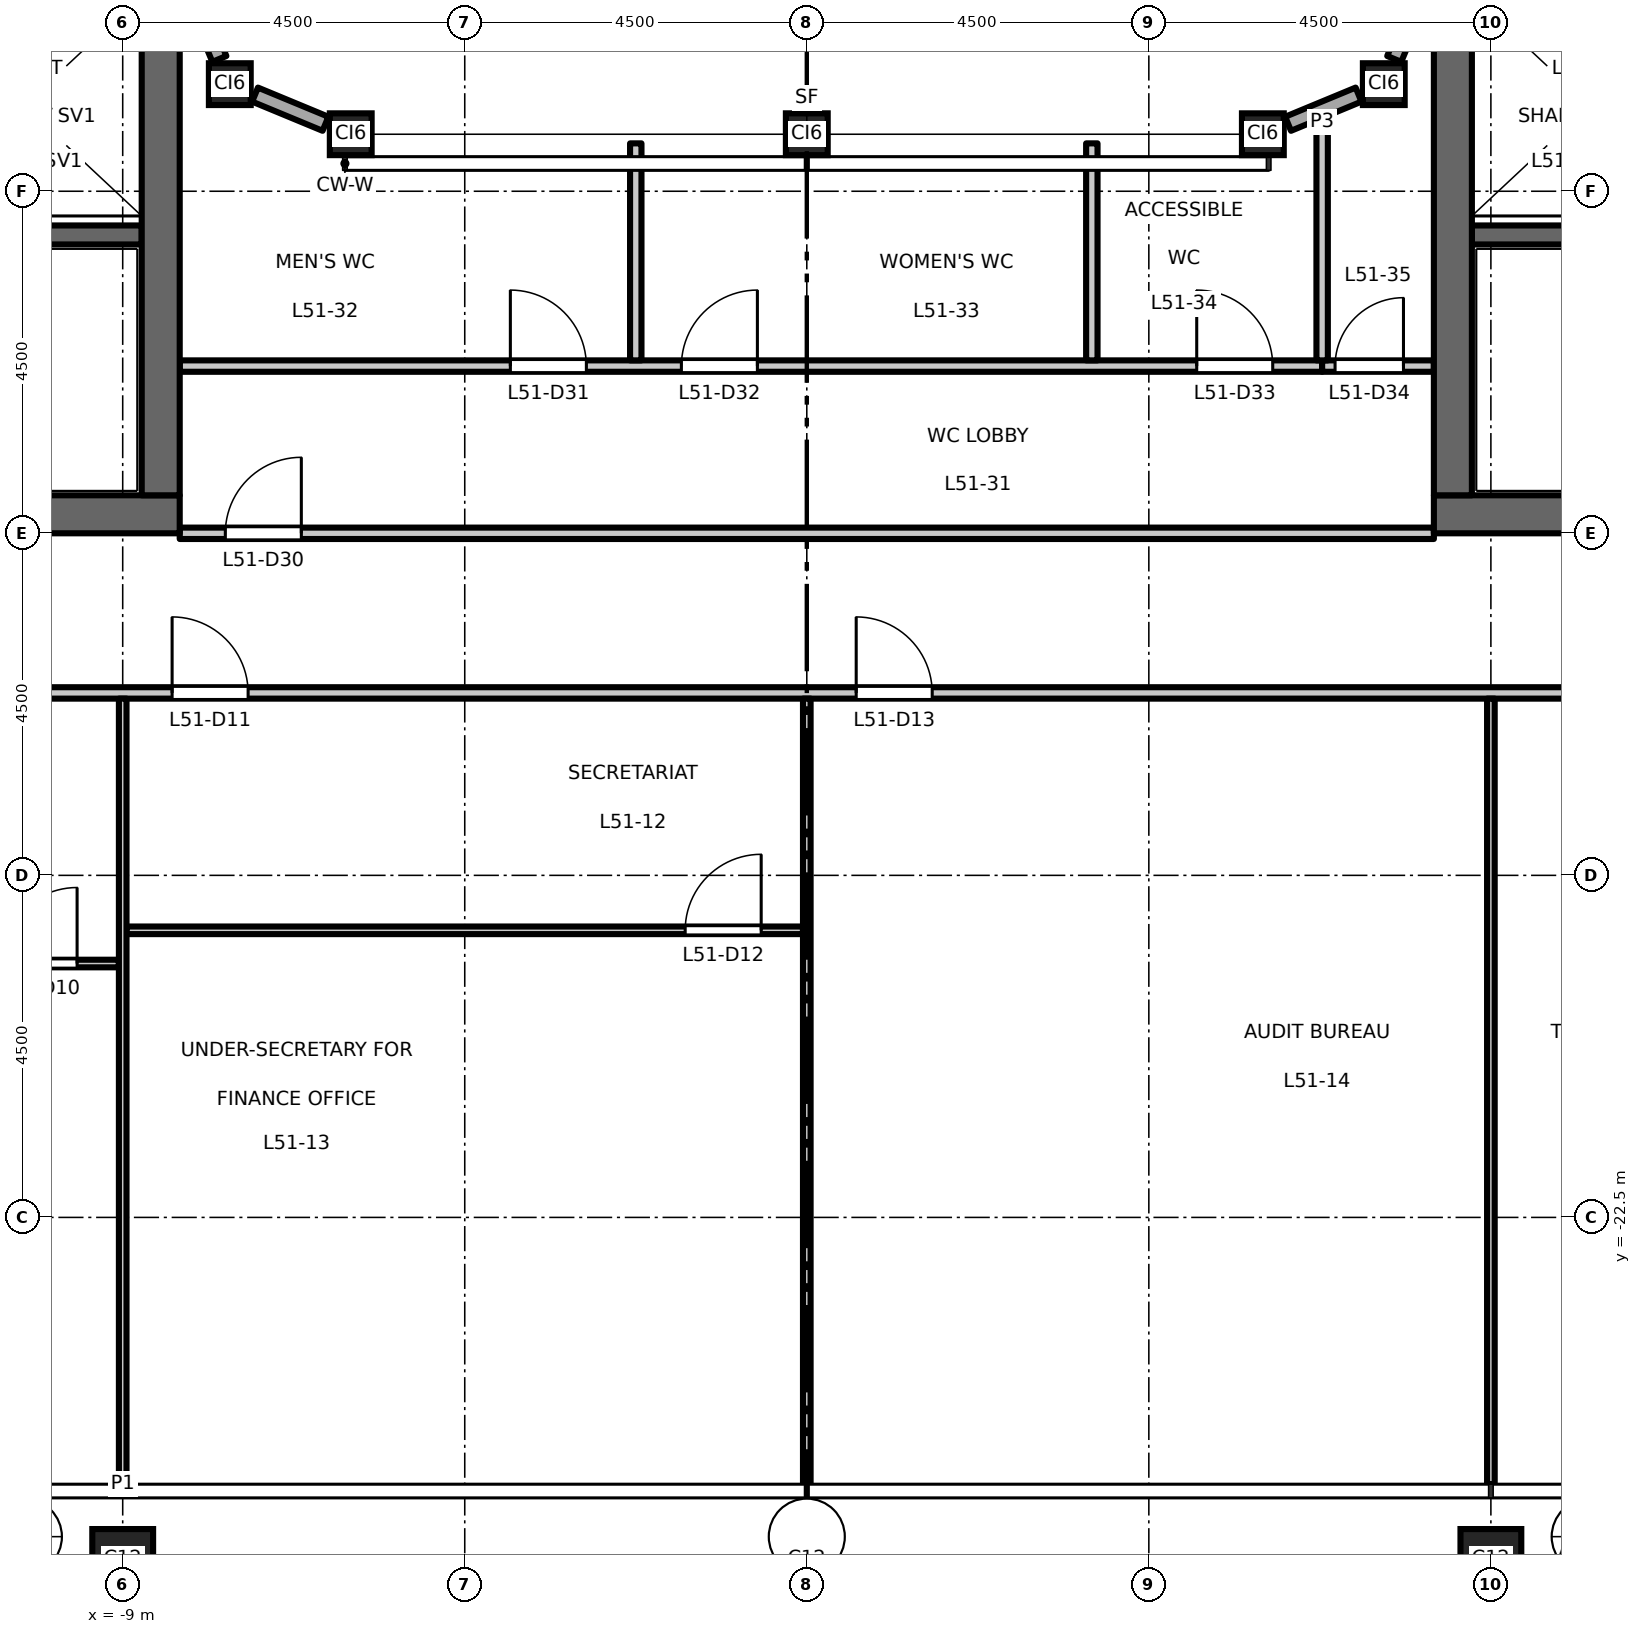
"""IFC4 building model, lengths in metres.
Left out: names, types, materials, properties, quantities, classifications, styles, units other than length and angle.
Written with IfcOpenShell. Run it as: python <this file> out.ifc"""

import sys

from ifc_helpers import new_model, si_unit, direction, frame, frame_2d, origin, origin_2d, place, context, subcontext, project, spatial, rectangle, hollow_rectangle, extrude, element, fill, save


model = new_model("IFC4")
c1 = context("Model", 3, precision=1e-05, world=origin(), true_north=direction((0.0, 1.0)))
c2 = subcontext(c1, "Body", "Model", "MODEL_VIEW")
j1 = project(units=[si_unit("LENGTHUNIT", "METRE"), si_unit("PLANEANGLEUNIT", "RADIAN")], contexts=[c1])
p1 = place(None, origin())
s1 = spatial("IfcSite", under=j1, at=p1, CompositionType="ELEMENT")
p2 = place(p1, origin())
s2 = spatial("IfcBuilding", under=s1, at=p2, CompositionType="ELEMENT")
p3 = place(p2, frame((0.0, 0.0, 237.7)))
s3 = spatial("IfcBuildingStorey", under=s2, at=p3, CompositionType="ELEMENT", Elevation=237.7)
for number, where, z_axis, x_axis in (
    (1, (-9.0, -27.0, 0.0), (0.0, 0.0, 1.0), (1.0, 0.0, 0.0)),
    (2, (0.0, -27.0, 0.0), (0.0, 0.0, 1.0), (1.0, 0.0, 0.0)),
    (3, (9.0, -27.0, 0.0), (0.0, 0.0, 1.0), (1.0, 0.0, 0.0)),
):
    element("IfcColumn", number, at=place(p3, frame(where, z_axis=z_axis, x_axis=x_axis)), inside=s3, PredefinedType="COLUMN", context=c2, shape_type="SweptSolid", body=[
        extrude(hollow_rectangle(XDim=0.8, YDim=0.8, WallThickness=0.045, at=origin_2d()), origin(), (0.0, 0.0, 1.0), 4.5),
    ])
for number, where, z_axis, x_axis in (
    (4, (-7.591, -7.591, 0.0), (0.0, 0.0, 1.0), (1.0, 0.0, 0.0)),
    (5, (-6.0, -8.25, 0.0), (0.0, 0.0, 1.0), (1.0, 0.0, 0.0)),
    (6, (0.0, -8.25, 0.0), (0.0, 0.0, 1.0), (1.0, 0.0, 0.0)),
    (7, (6.0, -8.25, 0.0), (0.0, 0.0, 1.0), (1.0, 0.0, 0.0)),
    (8, (7.591, -7.591, 0.0), (0.0, 0.0, 1.0), (1.0, 0.0, 0.0)),
):
    element("IfcColumn", number, at=place(p3, frame(where, z_axis=z_axis, x_axis=x_axis)), inside=s3, PredefinedType="COLUMN", context=c2, shape_type="SweptSolid", body=[
        extrude(hollow_rectangle(XDim=0.55, YDim=0.55, WallThickness=0.028, at=origin_2d()), origin(), (0.0, 0.0, 1.0), 4.5),
    ])
p4 = place(p3, frame((-8.75, -9.575, 0.0), z_axis=(0.0, 0.0, 1.0), x_axis=(-1.0, 0.0, 0.0)))
e9 = element("IfcWall", 9, at=p4, inside=s3, PredefinedType="SHEAR", context=c2, shape_type="SweptSolid", body=[
    extrude(rectangle(XDim=8.0, YDim=0.25, at=frame_2d((4.0, 0.0))), origin(), (0.0, 0.0, 1.0), 4.35),
])
p5 = place(p4, frame((6.65, 0.0, 0.0)))
e10 = element("IfcOpeningElement", 10, at=p5, cuts=e9, PredefinedType="OPENING", context=c2, shape_type="SweptSolid", body=[
    extrude(rectangle(XDim=1.1, YDim=2.1, at=frame_2d((0.55, 1.05))), frame((0.0, 0.135, 0.0), z_axis=(0.0, -1.0, 0.0), x_axis=(1.0, 0.0, 0.0)), (0.0, 0.0, 1.0), 0.27),
])
p6 = place(p3, frame((-8.25, -13.25, 0.0), z_axis=(0.0, 0.0, 1.0), x_axis=(-1.0, 0.0, 0.0)))
e11 = element("IfcWall", 11, at=p6, inside=s3, PredefinedType="SHEAR", context=c2, shape_type="SweptSolid", body=[
    extrude(rectangle(XDim=13.5, YDim=0.5, at=frame_2d((6.75, 0.0))), origin(), (0.0, 0.0, 1.0), 4.35),
])
p7 = place(p3, frame((-8.5, -13.0, 0.0), z_axis=(0.0, 0.0, 1.0), x_axis=(0.0, 1.0, 0.0)))
e12 = element("IfcWall", 12, at=p7, inside=s3, PredefinedType="SHEAR", context=c2, shape_type="SweptSolid", body=[
    extrude(rectangle(XDim=26.0, YDim=0.5, at=frame_2d((13.0, 0.0))), origin(), (0.0, 0.0, 1.0), 4.35),
])
p8 = place(p3, frame((8.75, -9.575, 0.0), z_axis=(0.0, 0.0, 1.0), x_axis=(1.0, 0.0, 0.0)))
e13 = element("IfcWall", 13, at=p8, inside=s3, PredefinedType="SHEAR", context=c2, shape_type="SweptSolid", body=[
    extrude(rectangle(XDim=8.0, YDim=0.25, at=frame_2d((4.0, 0.0))), origin(), (0.0, 0.0, 1.0), 4.35),
])
p9 = place(p8, frame((6.65, 0.0, 0.0)))
e14 = element("IfcOpeningElement", 14, at=p9, cuts=e13, PredefinedType="OPENING", context=c2, shape_type="SweptSolid", body=[
    extrude(rectangle(XDim=1.1, YDim=2.1, at=frame_2d((0.55, 1.05))), frame((0.0, 0.135, 0.0), z_axis=(0.0, -1.0, 0.0), x_axis=(1.0, 0.0, 0.0)), (0.0, 0.0, 1.0), 0.27),
])
p10 = place(p3, frame((8.25, -13.25, 0.0), z_axis=(0.0, 0.0, 1.0), x_axis=(1.0, 0.0, 0.0)))
e15 = element("IfcWall", 15, at=p10, inside=s3, PredefinedType="SHEAR", context=c2, shape_type="SweptSolid", body=[
    extrude(rectangle(XDim=13.5, YDim=0.5, at=frame_2d((6.75, 0.0))), origin(), (0.0, 0.0, 1.0), 4.35),
])
p11 = place(p3, frame((8.5, -13.0, 0.0), z_axis=(0.0, 0.0, 1.0), x_axis=(0.0, 1.0, 0.0)))
e16 = element("IfcWall", 16, at=p11, inside=s3, PredefinedType="SHEAR", context=c2, shape_type="SweptSolid", body=[
    extrude(rectangle(XDim=26.0, YDim=0.5, at=frame_2d((13.0, 0.0))), origin(), (0.0, 0.0, 1.0), 4.35),
])
p12 = place(p3, frame((6.332, -8.113, 0.0), z_axis=(0.0, 0.0, 1.0), x_axis=(0.923859650767, 0.382731427616, 0.0)))
e17 = element("IfcWall", 17, at=p12, inside=s3, PredefinedType="STANDARD", context=c2, shape_type="SweptSolid", body=[
    extrude(rectangle(XDim=1.003, YDim=0.2, at=frame_2d((0.502, 0.0))), origin(), (0.0, 0.0, 1.0), 3.918),
])
for number, where, z_axis, x_axis in (
    (18, (7.729, -7.259, 0.0), (0.0, 0.0, 1.0), (0.383, 0.924, 0.0)),
    (19, (-8.154, -6.231, 0.0), (0.0, 0.0, 1.0), (0.383, -0.924, 0.0)),
):
    element("IfcWall", number, at=place(p3, frame(where, z_axis=z_axis, x_axis=x_axis)), inside=s3, PredefinedType="STANDARD", context=c2, shape_type="SweptSolid", body=[
        extrude(rectangle(XDim=1.113, YDim=0.2, at=frame_2d((0.556, 0.0))), origin(), (0.0, 0.0, 1.0), 3.918),
    ])
p13 = place(p3, frame((-7.259, -7.729, 0.0), z_axis=(0.0, 0.0, 1.0), x_axis=(0.923859650767, -0.382731427616, 0.0)))
e20 = element("IfcWall", 20, at=p13, inside=s3, PredefinedType="STANDARD", context=c2, shape_type="SweptSolid", body=[
    extrude(rectangle(XDim=1.003, YDim=0.2, at=frame_2d((0.502, 0.0))), origin(), (0.0, 0.0, 1.0), 3.918),
])
p14 = place(p3, frame((-17.95, -19.16, 0.0), z_axis=(0.0, 0.0, 1.0), x_axis=(1.0, 0.0, 0.0)))
e21 = element("IfcWall", 21, at=p14, inside=s3, PredefinedType="PARTITIONING", context=c2, shape_type="SweptSolid", body=[
    extrude(rectangle(XDim=8.9, YDim=0.1, at=frame_2d((4.45, 0.0))), origin(), (0.0, 0.0, 1.0), 4.35),
])
p15 = place(p14, frame((7.35, 0.0, 0.0)))
e22 = element("IfcOpeningElement", 22, at=p15, cuts=e21, PredefinedType="OPENING", context=c2, shape_type="SweptSolid", body=[
    extrude(rectangle(XDim=1.0, YDim=2.1, at=frame_2d((0.5, 1.05))), frame((0.0, 0.06, 0.0), z_axis=(0.0, -1.0, 0.0), x_axis=(1.0, 0.0, 0.0)), (0.0, 0.0, 1.0), 0.12),
])
p16 = place(p3, frame((-8.95, -18.723, 0.0), z_axis=(0.0, 0.0, 1.0), x_axis=(1.0, 0.0, 0.0)))
e23 = element("IfcWall", 23, at=p16, inside=s3, PredefinedType="PARTITIONING", context=c2, shape_type="SweptSolid", body=[
    extrude(rectangle(XDim=8.9, YDim=0.1, at=frame_2d((4.45, 0.0))), origin(), (0.0, 0.0, 1.0), 4.35),
])
p17 = place(p16, frame((7.35, 0.0, 0.0)))
e24 = element("IfcOpeningElement", 24, at=p17, cuts=e23, PredefinedType="OPENING", context=c2, shape_type="SweptSolid", body=[
    extrude(rectangle(XDim=1.0, YDim=2.1, at=frame_2d((0.5, 1.05))), frame((0.0, 0.06, 0.0), z_axis=(0.0, -1.0, 0.0), x_axis=(1.0, 0.0, 0.0)), (0.0, 0.0, 1.0), 0.12),
])
p18 = place(p3, frame((-23.925, -15.6, 0.0), z_axis=(0.0, 0.0, 1.0), x_axis=(1.0, 0.0, 0.0)))
e25 = element("IfcWall", 25, at=p18, inside=s3, PredefinedType="PARTITIONING", context=c2, shape_type="SweptSolid", body=[
    extrude(rectangle(XDim=47.85, YDim=0.15, at=frame_2d((23.925, 0.0))), origin(), (0.0, 0.0, 1.0), 4.35),
])
p19 = place(p18, frame((6.575, 0.0, 0.0)))
e26 = element("IfcOpeningElement", 26, at=p19, cuts=e25, PredefinedType="OPENING", context=c2, shape_type="SweptSolid", body=[
    extrude(rectangle(XDim=1.0, YDim=2.1, at=frame_2d((0.5, 1.05))), frame((0.0, 0.085, 0.0), z_axis=(0.0, -1.0, 0.0), x_axis=(1.0, 0.0, 0.0)), (0.0, 0.0, 1.0), 0.17),
])
p20 = place(p18, frame((15.575, 0.0, 0.0)))
e27 = element("IfcOpeningElement", 27, at=p20, cuts=e25, PredefinedType="OPENING", context=c2, shape_type="SweptSolid", body=[
    extrude(rectangle(XDim=1.0, YDim=2.1, at=frame_2d((0.5, 1.05))), frame((0.0, 0.085, 0.0), z_axis=(0.0, -1.0, 0.0), x_axis=(1.0, 0.0, 0.0)), (0.0, 0.0, 1.0), 0.17),
])
p21 = place(p18, frame((24.575, 0.0, 0.0)))
e28 = element("IfcOpeningElement", 28, at=p21, cuts=e25, PredefinedType="OPENING", context=c2, shape_type="SweptSolid", body=[
    extrude(rectangle(XDim=1.0, YDim=2.1, at=frame_2d((0.5, 1.05))), frame((0.0, 0.085, 0.0), z_axis=(0.0, -1.0, 0.0), x_axis=(1.0, 0.0, 0.0)), (0.0, 0.0, 1.0), 0.17),
])
p22 = place(p18, frame((40.325, 0.0, 0.0)))
e29 = element("IfcOpeningElement", 29, at=p22, cuts=e25, PredefinedType="OPENING", context=c2, shape_type="SweptSolid", body=[
    extrude(rectangle(XDim=1.0, YDim=2.1, at=frame_2d((0.5, 1.05))), frame((0.0, 0.085, 0.0), z_axis=(0.0, -1.0, 0.0), x_axis=(1.0, 0.0, 0.0)), (0.0, 0.0, 1.0), 0.17),
])
p23 = place(p18, frame((0.725, 0.0, 0.0)))
e30 = element("IfcOpeningElement", 30, at=p23, cuts=e25, PredefinedType="OPENING", context=c2, shape_type="SweptSolid", body=[
    extrude(rectangle(XDim=1.0, YDim=2.1, at=frame_2d((0.5, 1.05))), frame((0.0, 0.085, 0.0), z_axis=(0.0, -1.0, 0.0), x_axis=(1.0, 0.0, 0.0)), (0.0, 0.0, 1.0), 0.17),
])
p24 = place(p18, frame((42.575, 0.0, 0.0)))
e31 = element("IfcOpeningElement", 31, at=p24, cuts=e25, PredefinedType="OPENING", context=c2, shape_type="SweptSolid", body=[
    extrude(rectangle(XDim=1.0, YDim=2.1, at=frame_2d((0.5, 1.05))), frame((0.0, 0.085, 0.0), z_axis=(0.0, -1.0, 0.0), x_axis=(1.0, 0.0, 0.0)), (0.0, 0.0, 1.0), 0.17),
])
p25 = place(p3, frame((-8.25, -13.5, 0.0), z_axis=(0.0, 0.0, 1.0), x_axis=(1.0, 0.0, 0.0)))
e32 = element("IfcWall", 32, at=p25, inside=s3, PredefinedType="PARTITIONING", context=c2, shape_type="SweptSolid", body=[
    extrude(rectangle(XDim=16.5, YDim=0.15, at=frame_2d((8.25, 0.0))), origin(), (0.0, 0.0, 1.0), 3.95),
])
p26 = place(p25, frame((0.6, 0.0, 0.0)))
e33 = element("IfcOpeningElement", 33, at=p26, cuts=e32, PredefinedType="OPENING", context=c2, shape_type="SweptSolid", body=[
    extrude(rectangle(XDim=1.0, YDim=2.1, at=frame_2d((0.5, 1.05))), frame((0.0, 0.085, 0.0), z_axis=(0.0, -1.0, 0.0), x_axis=(1.0, 0.0, 0.0)), (0.0, 0.0, 1.0), 0.17),
])
p27 = place(p3, frame((-8.25, -11.3, 0.0), z_axis=(0.0, 0.0, 1.0), x_axis=(1.0, 0.0, 0.0)))
e34 = element("IfcWall", 34, at=p27, inside=s3, PredefinedType="PARTITIONING", context=c2, shape_type="SweptSolid", body=[
    extrude(rectangle(XDim=15.03, YDim=0.15, at=frame_2d((7.515, 0.0))), origin(), (0.0, 0.0, 1.0), 4.35),
])
p28 = place(p27, frame((4.35, 0.0, 0.0)))
e35 = element("IfcOpeningElement", 35, at=p28, cuts=e34, PredefinedType="OPENING", context=c2, shape_type="SweptSolid", body=[
    extrude(rectangle(XDim=1.0, YDim=2.1, at=frame_2d((0.5, 1.05))), frame((0.0, 0.085, 0.0), z_axis=(0.0, -1.0, 0.0), x_axis=(1.0, 0.0, 0.0)), (0.0, 0.0, 1.0), 0.17),
])
p29 = place(p27, frame((6.6, 0.0, 0.0)))
e36 = element("IfcOpeningElement", 36, at=p29, cuts=e34, PredefinedType="OPENING", context=c2, shape_type="SweptSolid", body=[
    extrude(rectangle(XDim=1.0, YDim=2.1, at=frame_2d((0.5, 1.05))), frame((0.0, 0.085, 0.0), z_axis=(0.0, -1.0, 0.0), x_axis=(1.0, 0.0, 0.0)), (0.0, 0.0, 1.0), 0.17),
])
p30 = place(p27, frame((13.38, 0.0, 0.0)))
e37 = element("IfcOpeningElement", 37, at=p30, cuts=e34, PredefinedType="OPENING", context=c2, shape_type="SweptSolid", body=[
    extrude(rectangle(XDim=1.0, YDim=2.1, at=frame_2d((0.5, 1.05))), frame((0.0, 0.085, 0.0), z_axis=(0.0, -1.0, 0.0), x_axis=(1.0, 0.0, 0.0)), (0.0, 0.0, 1.0), 0.17),
])
p31 = place(p3, frame((6.78, -11.3, 0.0), z_axis=(0.0, 0.0, 1.0), x_axis=(1.0, 0.0, 0.0)))
e38 = element("IfcWall", 38, at=p31, inside=s3, PredefinedType="PARTITIONING", context=c2, shape_type="SweptSolid", body=[
    extrude(rectangle(XDim=1.47, YDim=0.15, at=frame_2d((0.735, 0.0))), origin(), (0.0, 0.0, 1.0), 4.35),
])
p32 = place(p31, frame((0.17, 0.0, 0.0)))
e39 = element("IfcOpeningElement", 39, at=p32, cuts=e38, PredefinedType="OPENING", context=c2, shape_type="SweptSolid", body=[
    extrude(rectangle(XDim=0.9, YDim=2.1, at=frame_2d((0.45, 1.05))), frame((0.0, 0.085, 0.0), z_axis=(0.0, -1.0, 0.0), x_axis=(1.0, 0.0, 0.0)), (0.0, 0.0, 1.0), 0.17),
])
p33 = place(p3, frame((-9.0, -26.01, 0.0), z_axis=(0.0, 0.0, 1.0), x_axis=(0.0, 1.0, 0.0)))
e40 = element("IfcWall", 40, at=p33, inside=s3, PredefinedType="PARTITIONING", context=c2, shape_type="SweptSolid", body=[
    extrude(rectangle(XDim=10.335, YDim=0.1, at=frame_2d((5.167, 0.0))), origin(), (0.0, 0.0, 1.0), 3.65),
])
p34 = place(p3, frame((-2.25, -11.225, 0.0), z_axis=(0.0, 0.0, 1.0), x_axis=(0.0, 1.0, 0.0)))
e41 = element("IfcWall", 41, at=p34, inside=s3, PredefinedType="PARTITIONING", context=c2, shape_type="SweptSolid", body=[
    extrude(rectangle(XDim=2.855, YDim=0.15, at=frame_2d((1.427, 0.0))), origin(), (0.0, 0.0, 1.0), 4.35),
])
p35 = place(p3, frame((0.0, -26.01, 0.0), z_axis=(0.0, 0.0, 1.0), x_axis=(0.0, 1.0, 0.0)))
e42 = element("IfcWall", 42, at=p35, inside=s3, PredefinedType="PARTITIONING", context=c2, shape_type="SweptSolid", body=[
    extrude(rectangle(XDim=10.335, YDim=0.1, at=frame_2d((5.167, 0.0))), origin(), (0.0, 0.0, 1.0), 3.55),
])
p36 = place(p3, frame((3.75, -11.225, 0.0), z_axis=(0.0, 0.0, 1.0), x_axis=(0.0, 1.0, 0.0)))
e43 = element("IfcWall", 43, at=p36, inside=s3, PredefinedType="PARTITIONING", context=c2, shape_type="SweptSolid", body=[
    extrude(rectangle(XDim=2.855, YDim=0.15, at=frame_2d((1.427, 0.0))), origin(), (0.0, 0.0, 1.0), 4.35),
])
p37 = place(p3, frame((6.78, -11.225, 0.0), z_axis=(0.0, 0.0, 1.0), x_axis=(0.0, 1.0, 0.0)))
e44 = element("IfcWall", 44, at=p37, inside=s3, PredefinedType="PARTITIONING", context=c2, shape_type="SweptSolid", body=[
    extrude(rectangle(XDim=3.138, YDim=0.15, at=frame_2d((1.569, 0.0))), origin(), (0.0, 0.0, 1.0), 4.35),
])
p38 = place(p3, frame((9.0, -26.01, 0.0), z_axis=(0.0, 0.0, 1.0), x_axis=(0.0, 1.0, 0.0)))
e45 = element("IfcWall", 45, at=p38, inside=s3, PredefinedType="PARTITIONING", context=c2, shape_type="SweptSolid", body=[
    extrude(rectangle(XDim=10.335, YDim=0.1, at=frame_2d((5.167, 0.0))), origin(), (0.0, 0.0, 1.0), 3.65),
])
p39 = place(p15, origin())
e46 = element("IfcDoor", 46, at=p39, inside=s3, OperationType="SINGLE_SWING_RIGHT", PredefinedType="DOOR", context=c2, shape_type="SweptSolid", body=[
    extrude(rectangle(XDim=1.0, YDim=2.1, at=frame_2d((0.5, 1.05))), frame((0.0, 0.025, 0.0), z_axis=(0.0, -1.0, 0.0), x_axis=(1.0, 0.0, 0.0)), (0.0, 0.0, 1.0), 0.05),
])
fill(e22, e46)
p40 = place(p20, origin())
e47 = element("IfcDoor", 47, at=p40, inside=s3, OperationType="SINGLE_SWING_LEFT", PredefinedType="DOOR", context=c2, shape_type="SweptSolid", body=[
    extrude(rectangle(XDim=1.0, YDim=2.1, at=frame_2d((0.5, 1.05))), frame((0.0, 0.025, 0.0), z_axis=(0.0, -1.0, 0.0), x_axis=(1.0, 0.0, 0.0)), (0.0, 0.0, 1.0), 0.05),
])
fill(e27, e47)
p41 = place(p17, origin())
e48 = element("IfcDoor", 48, at=p41, inside=s3, OperationType="SINGLE_SWING_RIGHT", PredefinedType="DOOR", context=c2, shape_type="SweptSolid", body=[
    extrude(rectangle(XDim=1.0, YDim=2.1, at=frame_2d((0.5, 1.05))), frame((0.0, 0.025, 0.0), z_axis=(0.0, -1.0, 0.0), x_axis=(1.0, 0.0, 0.0)), (0.0, 0.0, 1.0), 0.05),
])
fill(e24, e48)
p42 = place(p21, origin())
e49 = element("IfcDoor", 49, at=p42, inside=s3, OperationType="SINGLE_SWING_LEFT", PredefinedType="DOOR", context=c2, shape_type="SweptSolid", body=[
    extrude(rectangle(XDim=1.0, YDim=2.1, at=frame_2d((0.5, 1.05))), frame((0.0, 0.025, 0.0), z_axis=(0.0, -1.0, 0.0), x_axis=(1.0, 0.0, 0.0)), (0.0, 0.0, 1.0), 0.05),
])
fill(e28, e49)
p43 = place(p26, origin())
e50 = element("IfcDoor", 50, at=p43, inside=s3, OperationType="SINGLE_SWING_RIGHT", PredefinedType="DOOR", context=c2, shape_type="SweptSolid", body=[
    extrude(rectangle(XDim=1.0, YDim=2.1, at=frame_2d((0.5, 1.05))), frame((0.0, 0.025, 0.0), z_axis=(0.0, -1.0, 0.0), x_axis=(1.0, 0.0, 0.0)), (0.0, 0.0, 1.0), 0.05),
])
fill(e33, e50)
p44 = place(p28, origin())
e51 = element("IfcDoor", 51, at=p44, inside=s3, OperationType="SINGLE_SWING_LEFT", PredefinedType="DOOR", context=c2, shape_type="SweptSolid", body=[
    extrude(rectangle(XDim=1.0, YDim=2.1, at=frame_2d((0.5, 1.05))), frame((0.0, 0.025, 0.0), z_axis=(0.0, -1.0, 0.0), x_axis=(1.0, 0.0, 0.0)), (0.0, 0.0, 1.0), 0.05),
])
fill(e35, e51)
p45 = place(p29, origin())
e52 = element("IfcDoor", 52, at=p45, inside=s3, OperationType="SINGLE_SWING_RIGHT", PredefinedType="DOOR", context=c2, shape_type="SweptSolid", body=[
    extrude(rectangle(XDim=1.0, YDim=2.1, at=frame_2d((0.5, 1.05))), frame((0.0, 0.025, 0.0), z_axis=(0.0, -1.0, 0.0), x_axis=(1.0, 0.0, 0.0)), (0.0, 0.0, 1.0), 0.05),
])
fill(e36, e52)
p46 = place(p30, origin())
e53 = element("IfcDoor", 53, at=p46, inside=s3, OperationType="SINGLE_SWING_LEFT", PredefinedType="DOOR", context=c2, shape_type="SweptSolid", body=[
    extrude(rectangle(XDim=1.0, YDim=2.1, at=frame_2d((0.5, 1.05))), frame((0.0, 0.025, 0.0), z_axis=(0.0, -1.0, 0.0), x_axis=(1.0, 0.0, 0.0)), (0.0, 0.0, 1.0), 0.05),
])
fill(e37, e53)
p47 = place(p32, origin())
e54 = element("IfcDoor", 54, at=p47, inside=s3, OperationType="SINGLE_SWING_RIGHT", PredefinedType="DOOR", context=c2, shape_type="SweptSolid", body=[
    extrude(rectangle(XDim=0.9, YDim=2.1, at=frame_2d((0.45, 1.05))), frame((0.0, 0.025, 0.0), z_axis=(0.0, -1.0, 0.0), x_axis=(1.0, 0.0, 0.0)), (0.0, 0.0, 1.0), 0.05),
])
fill(e39, e54)
save(model, sys.argv[1])
